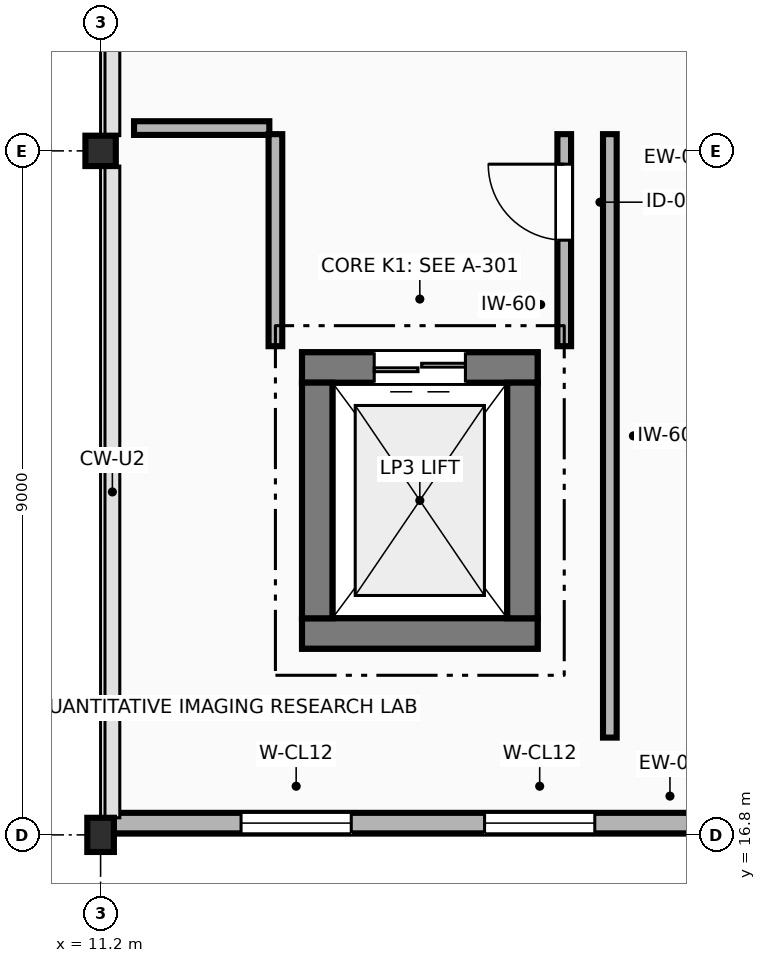
"""IFC4 building model, lengths in metres.
Left out: names, types, materials, properties, quantities, classifications, styles, units other than length and angle.
Written with IfcOpenShell. Run it as: python <this file> out.ifc"""

import sys

from ifc_helpers import new_model, si_unit, direction, frame, frame_2d, origin, origin_2d, place, context, subcontext, project, spatial, rectangle, extrude, element, fill, save


model = new_model("IFC4")
c1 = context("Model", 3, precision=1e-05, world=origin(), true_north=direction((0.0, 1.0)))
c2 = subcontext(c1, "Body", "Model", "MODEL_VIEW")
j1 = project(units=[si_unit("LENGTHUNIT", "METRE"), si_unit("PLANEANGLEUNIT", "RADIAN")], contexts=[c1])
p1 = place(None, origin())
s1 = spatial("IfcSite", under=j1, at=p1, CompositionType="ELEMENT")
p2 = place(p1, origin())
s2 = spatial("IfcBuilding", under=s1, at=p2, CompositionType="ELEMENT")
p3 = place(p2, frame((0.0, 0.0, 22.2)))
s3 = spatial("IfcBuildingStorey", under=s2, at=p3, CompositionType="ELEMENT", Elevation=22.2)
p4 = place(p3, frame((11.2, 16.8, 0.0), z_axis=(0.0, 0.0, 1.0), x_axis=(1.0, 0.0, 0.0)))
e1 = element("IfcColumn", 1, at=p4, inside=s3, PredefinedType="COLUMN", context=c2, shape_type="SweptSolid", body=[
    extrude(rectangle(XDim=0.35, YDim=0.45, at=origin_2d()), origin(), (0.0, 0.0, 1.0), 4.2),
])
p5 = place(p3, frame((11.2, 25.8, 0.0), z_axis=(0.0, 0.0, 1.0), x_axis=(1.0, 0.0, 0.0)))
e2 = element("IfcColumn", 2, at=p5, inside=s3, PredefinedType="COLUMN", context=c2, shape_type="SweptSolid", body=[
    extrude(rectangle(XDim=0.4, YDim=0.4, at=origin_2d()), origin(), (0.0, 0.0, 1.0), 4.2),
])
p6 = place(p3, frame((11.37, 16.955, 0.0), z_axis=(0.0, 0.0, 1.0), x_axis=(1.0, 0.0, 0.0)))
e3 = element("IfcWall", 3, at=p6, inside=s3, PredefinedType="STANDARD", context=c2, shape_type="SweptSolid", body=[
    extrude(rectangle(XDim=8.01, YDim=0.27, at=frame_2d((4.005, 0.0))), origin(), (0.0, 0.0, 1.0), 3.26),
])
p7 = place(p6, frame((1.678, 0.0, 0.95)))
e4 = element("IfcOpeningElement", 4, at=p7, cuts=e3, PredefinedType="OPENING", context=c2, shape_type="SweptSolid", body=[
    extrude(rectangle(XDim=1.45, YDim=1.7, at=frame_2d((0.725, 0.85))), frame((0.0, 0.145, 0.0), z_axis=(0.0, -1.0, 0.0), x_axis=(1.0, 0.0, 0.0)), (0.0, 0.0, 1.0), 0.29),
])
p8 = place(p6, frame((4.882, 0.0, 0.95)))
e5 = element("IfcOpeningElement", 5, at=p8, cuts=e3, PredefinedType="OPENING", context=c2, shape_type="SweptSolid", body=[
    extrude(rectangle(XDim=1.45, YDim=1.7, at=frame_2d((0.725, 0.85))), frame((0.0, 0.145, 0.0), z_axis=(0.0, -1.0, 0.0), x_axis=(1.0, 0.0, 0.0)), (0.0, 0.0, 1.0), 0.29),
])
p9 = place(p3, frame((13.85, 19.45, 0.0), z_axis=(0.0, 0.0, 1.0), x_axis=(1.0, 0.0, 0.0)))
e6 = element("IfcWall", 6, at=p9, inside=s3, PredefinedType="SHEAR", context=c2, shape_type="SweptSolid", body=[
    extrude(rectangle(XDim=3.1, YDim=0.4, at=frame_2d((1.55, 0.0))), origin(), (0.0, 0.0, 1.0), 4.2),
])
p10 = place(p3, frame((16.95, 22.95, 0.0), z_axis=(0.0, 0.0, 1.0), x_axis=(-1.0, 0.0, 0.0)))
e7 = element("IfcWall", 7, at=p10, inside=s3, PredefinedType="SHEAR", context=c2, shape_type="SweptSolid", body=[
    extrude(rectangle(XDim=3.1, YDim=0.4, at=frame_2d((1.55, 0.0))), origin(), (0.0, 0.0, 1.0), 4.2),
])
p11 = place(p10, frame((0.95, 0.0, 0.0)))
e8 = element("IfcOpeningElement", 8, at=p11, cuts=e7, PredefinedType="OPENING", context=c2, shape_type="SweptSolid", body=[
    extrude(rectangle(XDim=1.2, YDim=2.2, at=frame_2d((0.6, 1.1))), frame((0.0, 0.21, 0.0), z_axis=(0.0, -1.0, 0.0), x_axis=(1.0, 0.0, 0.0)), (0.0, 0.0, 1.0), 0.42),
])
for number, where, z_axis, x_axis in (
    (9, (14.05, 19.65, 0.0), (0.0, 0.0, 1.0), (0.0, 1.0, 0.0)),
    (10, (16.75, 22.75, 0.0), (0.0, 0.0, 1.0), (0.0, -1.0, 0.0)),
):
    element("IfcWall", number, at=place(p3, frame(where, z_axis=z_axis, x_axis=x_axis)), inside=s3, PredefinedType="SHEAR", context=c2, shape_type="SweptSolid", body=[
        extrude(rectangle(XDim=3.1, YDim=0.4, at=frame_2d((1.55, 0.0))), origin(), (0.0, 0.0, 1.0), 4.2),
    ])
for number, where, z_axis, x_axis in (
    (11, (13.85, 19.45, 4.2), (0.0, 0.0, 1.0), (1.0, 0.0, 0.0)),
    (12, (16.95, 22.95, 4.2), (0.0, 0.0, 1.0), (-1.0, 0.0, 0.0)),
):
    element("IfcWall", number, at=place(p3, frame(where, z_axis=z_axis, x_axis=x_axis)), inside=s3, PredefinedType="SHEAR", context=c2, shape_type="SweptSolid", body=[
        extrude(rectangle(XDim=3.1, YDim=0.4, at=frame_2d((1.55, 0.0))), origin(), (0.0, 0.0, 1.0), 3.15),
    ])
for number, where, z_axis, x_axis in (
    (13, (14.05, 19.65, 4.2), (0.0, 0.0, 1.0), (0.0, 1.0, 0.0)),
    (14, (16.75, 22.75, 4.2), (0.0, 0.0, 1.0), (0.0, -1.0, 0.0)),
):
    element("IfcWall", number, at=place(p3, frame(where, z_axis=z_axis, x_axis=x_axis)), inside=s3, PredefinedType="SHEAR", context=c2, shape_type="SweptSolid", body=[
        extrude(rectangle(XDim=3.1, YDim=0.4, at=frame_2d((1.55, 0.0))), origin(), (0.0, 0.0, 1.0), 3.15),
    ])
p12 = place(p3, frame((17.3, 23.23, 0.0), z_axis=(0.0, 0.0, 1.0), x_axis=(0.0, 1.0, 0.0)))
e15 = element("IfcWall", 15, at=p12, inside=s3, PredefinedType="PARTITIONING", context=c2, shape_type="SweptSolid", body=[
    extrude(rectangle(XDim=2.79, YDim=0.18, at=frame_2d((1.395, 0.0))), origin(), (0.0, 0.0, 1.0), 3.92),
])
p13 = place(p12, frame((1.395, 0.0, 0.0)))
e16 = element("IfcOpeningElement", 16, at=p13, cuts=e15, PredefinedType="OPENING", context=c2, shape_type="SweptSolid", body=[
    extrude(rectangle(XDim=1.0, YDim=2.15, at=frame_2d((0.5, 1.075))), frame((0.0, 0.1, 0.0), z_axis=(0.0, -1.0, 0.0), x_axis=(1.0, 0.0, 0.0)), (0.0, 0.0, 1.0), 0.2),
])
p14 = place(p3, frame((17.9, 26.02, 0.0), z_axis=(0.0, 0.0, 1.0), x_axis=(0.0, -1.0, 0.0)))
e17 = element("IfcWall", 17, at=p14, inside=s3, PredefinedType="PARTITIONING", context=c2, shape_type="SweptSolid", body=[
    extrude(rectangle(XDim=7.94, YDim=0.18, at=frame_2d((3.97, 0.0))), origin(), (0.0, 0.0, 1.0), 3.92),
])
p15 = place(p3, frame((11.64, 26.1, 0.0), z_axis=(0.0, 0.0, 1.0), x_axis=(1.0, 0.0, 0.0)))
e18 = element("IfcWall", 18, at=p15, inside=s3, PredefinedType="PARTITIONING", context=c2, shape_type="SweptSolid", body=[
    extrude(rectangle(XDim=1.78, YDim=0.18, at=frame_2d((0.89, 0.0))), origin(), (0.0, 0.0, 1.0), 3.26),
])
p16 = place(p3, frame((13.5, 26.02, 0.0), z_axis=(0.0, 0.0, 1.0), x_axis=(0.0, -1.0, 0.0)))
e19 = element("IfcWall", 19, at=p16, inside=s3, PredefinedType="PARTITIONING", context=c2, shape_type="SweptSolid", body=[
    extrude(rectangle(XDim=2.79, YDim=0.18, at=frame_2d((1.395, 0.0))), origin(), (0.0, 0.0, 1.0), 3.92),
])
p17 = place(p7, origin())
e20 = element("IfcWindow", 20, at=p17, inside=s3, PartitioningType="SINGLE_PANEL", PredefinedType="WINDOW", context=c2, shape_type="SweptSolid", body=[
    extrude(rectangle(XDim=1.45, YDim=1.7, at=frame_2d((0.725, 0.85))), frame((0.0, 0.03, 0.0), z_axis=(0.0, -1.0, 0.0), x_axis=(1.0, 0.0, 0.0)), (0.0, 0.0, 1.0), 0.06),
])
fill(e4, e20)
p18 = place(p8, origin())
e21 = element("IfcWindow", 21, at=p18, inside=s3, PartitioningType="SINGLE_PANEL", PredefinedType="WINDOW", context=c2, shape_type="SweptSolid", body=[
    extrude(rectangle(XDim=1.45, YDim=1.7, at=frame_2d((0.725, 0.85))), frame((0.0, 0.03, 0.0), z_axis=(0.0, -1.0, 0.0), x_axis=(1.0, 0.0, 0.0)), (0.0, 0.0, 1.0), 0.06),
])
fill(e5, e21)
p19 = place(p11, origin())
e22 = element("IfcDoor", 22, at=p19, inside=s3, OperationType="DOUBLE_DOOR_SLIDING", PredefinedType="DOOR", context=c2, shape_type="SweptSolid", body=[
    extrude(rectangle(XDim=1.2, YDim=2.2, at=frame_2d((0.6, 1.1))), frame((0.0, 0.025, 0.0), z_axis=(0.0, -1.0, 0.0), x_axis=(1.0, 0.0, 0.0)), (0.0, 0.0, 1.0), 0.05),
])
fill(e8, e22)
p20 = place(p13, origin())
e23 = element("IfcDoor", 23, at=p20, inside=s3, OperationType="SINGLE_SWING_RIGHT", PredefinedType="DOOR", context=c2, shape_type="SweptSolid", body=[
    extrude(rectangle(XDim=1.0, YDim=2.15, at=frame_2d((0.5, 1.075))), frame((0.0, 0.025, 0.0), z_axis=(0.0, -1.0, 0.0), x_axis=(1.0, 0.0, 0.0)), (0.0, 0.0, 1.0), 0.05),
])
fill(e16, e23)
save(model, sys.argv[1])
